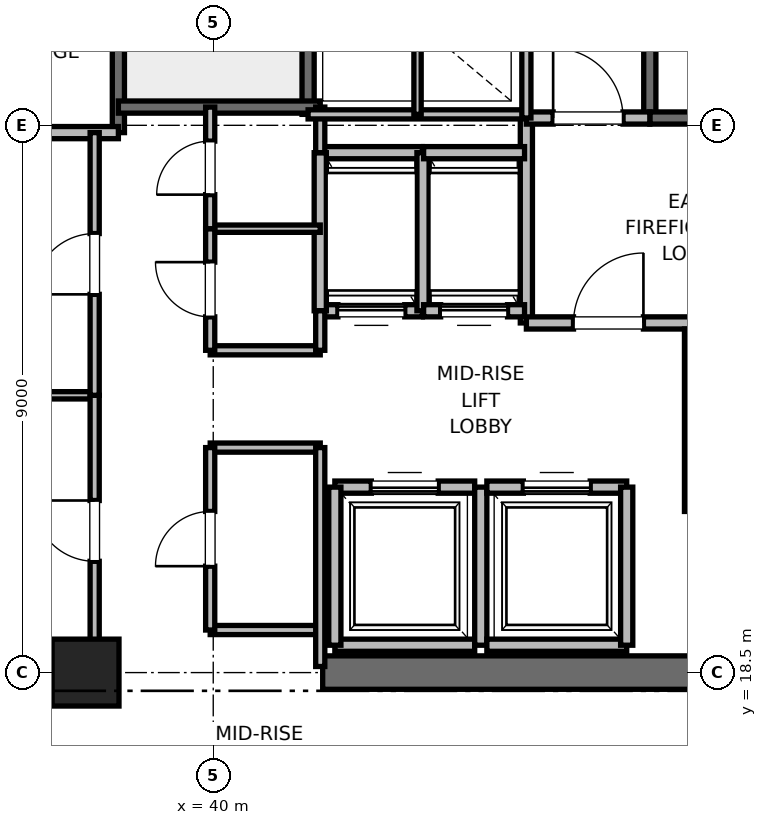
"""IFC4 building model, lengths in metres.
Left out: names, types, materials, properties, quantities, classifications, styles, units other than length and angle.
Written with IfcOpenShell. Run it as: python <this file> out.ifc"""

import sys

from ifc_helpers import new_model, si_unit, direction, frame, frame_2d, origin, origin_2d, place, context, subcontext, project, spatial, rectangle, extrude, element, fill, save


model = new_model("IFC4")
c1 = context("Model", 3, precision=1e-05, world=origin(), true_north=direction((0.0, 1.0)))
c2 = subcontext(c1, "Body", "Model", "MODEL_VIEW")
j1 = project(units=[si_unit("LENGTHUNIT", "METRE"), si_unit("PLANEANGLEUNIT", "RADIAN")], contexts=[c1])
p1 = place(None, origin())
s1 = spatial("IfcSite", under=j1, at=p1, CompositionType="ELEMENT")
p2 = place(p1, origin())
s2 = spatial("IfcBuilding", under=s1, at=p2, CompositionType="ELEMENT")
p3 = place(p2, frame((0.0, 0.0, 168.4)))
s3 = spatial("IfcBuildingStorey", under=s2, at=p3, CompositionType="ELEMENT", Elevation=168.4)
p4 = place(p3, frame((37.9, 18.5, 0.0), z_axis=(0.0, 0.0, 1.0), x_axis=(1.0, 0.0, 0.0)))
e1 = element("IfcColumn", 1, at=p4, inside=s3, PredefinedType="PILASTER", context=c2, shape_type="SweptSolid", body=[
    extrude(rectangle(XDim=1.1, YDim=1.1, at=origin_2d()), origin(), (0.0, 0.0, 1.0), 4.0),
])
for number, where, z_axis, x_axis in (
    (2, (29.0, 18.5, 0.0), (0.0, 0.0, 1.0), (1.0, 0.0, 0.0)),
    (3, (41.8, 18.5, 0.0), (0.0, 0.0, 1.0), (1.0, 0.0, 0.0)),
):
    element("IfcWall", number, at=place(p3, frame(where, z_axis=z_axis, x_axis=x_axis)), inside=s3, PredefinedType="SHEAR", context=c2, shape_type="SweptSolid", body=[
        extrude(rectangle(XDim=9.2, YDim=0.55, at=frame_2d((4.6, 0.0))), origin(), (0.0, 0.0, 1.0), 3.775),
    ])
p5 = place(p3, frame((47.18, 27.62, 0.0), z_axis=(0.0, 0.0, 1.0), x_axis=(0.0, 1.0, 0.0)))
e4 = element("IfcWall", 4, at=p5, inside=s3, PredefinedType="SOLIDWALL", context=c2, shape_type="SweptSolid", body=[
    extrude(rectangle(XDim=8.18, YDim=0.2, at=frame_2d((4.09, 0.0))), origin(), (0.0, 0.0, 1.0), 3.775),
])
p6 = place(p3, frame((47.18, 27.62, 0.0), z_axis=(0.0, 0.0, 1.0), x_axis=(1.0, 0.0, 0.0)))
e5 = element("IfcWall", 5, at=p6, inside=s3, PredefinedType="SOLIDWALL", context=c2, shape_type="SweptSolid", body=[
    extrude(rectangle(XDim=3.12, YDim=0.2, at=frame_2d((1.56, 0.0))), origin(), (0.0, 0.0, 1.0), 3.775),
])
p7 = place(p6, frame((1.01, 0.0, 0.0)))
e6 = element("IfcOpeningElement", 6, at=p7, cuts=e5, PredefinedType="OPENING", context=c2, shape_type="SweptSolid", body=[
    extrude(rectangle(XDim=1.1, YDim=2.15, at=frame_2d((0.55, 1.075))), frame((0.0, 0.1, 0.0), z_axis=(0.0, -1.0, 0.0), x_axis=(1.0, 0.0, 0.0)), (0.0, 0.0, 1.0), 0.2),
])
p8 = place(p3, frame((38.44, 27.38, 0.0), z_axis=(0.0, 0.0, 1.0), x_axis=(0.0, 1.0, 0.0)))
e7 = element("IfcWall", 7, at=p8, inside=s3, PredefinedType="SOLIDWALL", context=c2, shape_type="SweptSolid", body=[
    extrude(rectangle(XDim=8.87, YDim=0.2, at=frame_2d((4.435, 0.0))), origin(), (0.0, 0.0, 1.0), 3.775),
])
p9 = place(p3, frame((41.56, 27.68, 0.0), z_axis=(0.0, 0.0, 1.0), x_axis=(0.0, 1.0, 0.0)))
e8 = element("IfcWall", 8, at=p9, inside=s3, PredefinedType="SOLIDWALL", context=c2, shape_type="SweptSolid", body=[
    extrude(rectangle(XDim=8.57, YDim=0.2, at=frame_2d((4.285, 0.0))), origin(), (0.0, 0.0, 1.0), 3.775),
])
p10 = place(p3, frame((38.44, 27.8, 0.0), z_axis=(0.0, 0.0, 1.0), x_axis=(1.0, 0.0, 0.0)))
e9 = element("IfcWall", 9, at=p10, inside=s3, PredefinedType="SOLIDWALL", context=c2, shape_type="SweptSolid", body=[
    extrude(rectangle(XDim=3.32, YDim=0.2, at=frame_2d((1.66, 0.0))), origin(), (0.0, 0.0, 1.0), 3.775),
])
p11 = place(p3, frame((32.82, 27.38, 0.0), z_axis=(0.0, 0.0, 1.0), x_axis=(1.0, 0.0, 0.0)))
e10 = element("IfcWall", 10, at=p11, inside=s3, PredefinedType="PARTITIONING", context=c2, shape_type="SweptSolid", body=[
    extrude(rectangle(XDim=5.62, YDim=0.2, at=frame_2d((2.81, 0.0))), origin(), (0.0, 0.0, 1.0), 3.775),
])
p12 = place(p3, frame((45.15, 24.25, 0.0), z_axis=(0.0, 0.0, 1.0), x_axis=(0.0, 1.0, 0.0)))
e11 = element("IfcWall", 11, at=p12, inside=s3, PredefinedType="PARTITIONING", context=c2, shape_type="SweptSolid", body=[
    extrude(rectangle(XDim=3.37, YDim=0.2, at=frame_2d((1.685, 0.0))), origin(), (0.0, 0.0, 1.0), 3.775),
])
p13 = place(p3, frame((45.15, 24.25, 0.0), z_axis=(0.0, 0.0, 1.0), x_axis=(1.0, 0.0, 0.0)))
e12 = element("IfcWall", 12, at=p13, inside=s3, PredefinedType="PARTITIONING", context=c2, shape_type="SweptSolid", body=[
    extrude(rectangle(XDim=2.7, YDim=0.2, at=frame_2d((1.35, 0.0))), origin(), (0.0, 0.0, 1.0), 3.775),
])
p14 = place(p13, frame((0.775, 0.0, 0.0)))
e13 = element("IfcOpeningElement", 13, at=p14, cuts=e12, PredefinedType="OPENING", context=c2, shape_type="SweptSolid", body=[
    extrude(rectangle(XDim=1.15, YDim=2.2, at=frame_2d((0.575, 1.1))), frame((0.0, 0.1, 0.0), z_axis=(0.0, -1.0, 0.0), x_axis=(1.0, 0.0, 0.0)), (0.0, 0.0, 1.0), 0.2),
])
p15 = place(p3, frame((45.15, 27.62, 0.0), z_axis=(0.0, 0.0, 1.0), x_axis=(1.0, 0.0, 0.0)))
e14 = element("IfcWall", 14, at=p15, inside=s3, PredefinedType="PARTITIONING", context=c2, shape_type="SweptSolid", body=[
    extrude(rectangle(XDim=2.03, YDim=0.2, at=frame_2d((1.015, 0.0))), origin(), (0.0, 0.0, 1.0), 3.775),
])
p16 = place(p15, frame((0.44, 0.0, 0.0)))
e15 = element("IfcOpeningElement", 15, at=p16, cuts=e14, PredefinedType="OPENING", context=c2, shape_type="SweptSolid", body=[
    extrude(rectangle(XDim=1.15, YDim=2.2, at=frame_2d((0.575, 1.1))), frame((0.0, 0.1, 0.0), z_axis=(0.0, -1.0, 0.0), x_axis=(1.0, 0.0, 0.0)), (0.0, 0.0, 1.0), 0.2),
])
p17 = place(p3, frame((47.85, 24.15, 0.0), z_axis=(0.0, 0.0, 1.0), x_axis=(0.0, -1.0, 0.0)))
e16 = element("IfcWall", 16, at=p17, inside=s3, PredefinedType="SOLIDWALL", context=c2, shape_type="SweptSolid", body=[
    extrude(rectangle(XDim=3.0, YDim=0.2, at=frame_2d((1.5, 0.0))), origin(), (0.0, 0.0, 1.0), 3.775),
])
p18 = place(p3, frame((42.0, 18.95, 0.0), z_axis=(0.0, 0.0, 1.0), x_axis=(1.0, 0.0, 0.0)))
e17 = element("IfcWall", 17, at=p18, inside=s3, PredefinedType="SOLIDWALL", context=c2, shape_type="SweptSolid", body=[
    extrude(rectangle(XDim=2.3, YDim=0.2, at=frame_2d((1.15, 0.0))), origin(), (0.0, 0.0, 1.0), 2.755),
])
p19 = place(p3, frame((44.3, 21.55, 0.0), z_axis=(0.0, 0.0, 1.0), x_axis=(-1.0, 0.0, 0.0)))
e18 = element("IfcWall", 18, at=p19, inside=s3, PredefinedType="SOLIDWALL", context=c2, shape_type="SweptSolid", body=[
    extrude(rectangle(XDim=2.3, YDim=0.2, at=frame_2d((1.15, 0.0))), origin(), (0.0, 0.0, 1.0), 3.775),
])
p20 = place(p19, frame((0.6, 0.0, 0.0)))
e19 = element("IfcOpeningElement", 19, at=p20, cuts=e18, PredefinedType="OPENING", context=c2, shape_type="SweptSolid", body=[
    extrude(rectangle(XDim=1.1, YDim=2.2, at=frame_2d((0.55, 1.1))), frame((0.0, 0.1, 0.0), z_axis=(0.0, -1.0, 0.0), x_axis=(1.0, 0.0, 0.0)), (0.0, 0.0, 1.0), 0.2),
])
p21 = place(p3, frame((42.0, 21.55, 0.0), z_axis=(0.0, 0.0, 1.0), x_axis=(0.0, -1.0, 0.0)))
e20 = element("IfcWall", 20, at=p21, inside=s3, PredefinedType="SOLIDWALL", context=c2, shape_type="SweptSolid", body=[
    extrude(rectangle(XDim=2.6, YDim=0.2, at=frame_2d((1.3, 0.0))), origin(), (0.0, 0.0, 1.0), 2.755),
])
p22 = place(p3, frame((44.4, 18.95, 0.0), z_axis=(0.0, 0.0, 1.0), x_axis=(0.0, 1.0, 0.0)))
e21 = element("IfcWall", 21, at=p22, inside=s3, PredefinedType="SOLIDWALL", context=c2, shape_type="SweptSolid", body=[
    extrude(rectangle(XDim=2.6, YDim=0.2, at=frame_2d((1.3, 0.0))), origin(), (0.0, 0.0, 1.0), 3.775),
])
p23 = place(p3, frame((44.5, 18.95, 0.0), z_axis=(0.0, 0.0, 1.0), x_axis=(1.0, 0.0, 0.0)))
e22 = element("IfcWall", 22, at=p23, inside=s3, PredefinedType="SOLIDWALL", context=c2, shape_type="SweptSolid", body=[
    extrude(rectangle(XDim=2.3, YDim=0.2, at=frame_2d((1.15, 0.0))), origin(), (0.0, 0.0, 1.0), 3.775),
])
p24 = place(p3, frame((46.8, 21.55, 0.0), z_axis=(0.0, 0.0, 1.0), x_axis=(-1.0, 0.0, 0.0)))
e23 = element("IfcWall", 23, at=p24, inside=s3, PredefinedType="SOLIDWALL", context=c2, shape_type="SweptSolid", body=[
    extrude(rectangle(XDim=2.3, YDim=0.2, at=frame_2d((1.15, 0.0))), origin(), (0.0, 0.0, 1.0), 3.775),
])
p25 = place(p24, frame((0.6, 0.0, 0.0)))
e24 = element("IfcOpeningElement", 24, at=p25, cuts=e23, PredefinedType="OPENING", context=c2, shape_type="SweptSolid", body=[
    extrude(rectangle(XDim=1.1, YDim=2.2, at=frame_2d((0.55, 1.1))), frame((0.0, 0.1, 0.0), z_axis=(0.0, -1.0, 0.0), x_axis=(1.0, 0.0, 0.0)), (0.0, 0.0, 1.0), 0.2),
])
p26 = place(p3, frame((46.8, 18.95, 0.0), z_axis=(0.0, 0.0, 1.0), x_axis=(0.0, 1.0, 0.0)))
e25 = element("IfcWall", 25, at=p26, inside=s3, PredefinedType="SOLIDWALL", context=c2, shape_type="SweptSolid", body=[
    extrude(rectangle(XDim=2.6, YDim=0.2, at=frame_2d((1.3, 0.0))), origin(), (0.0, 0.0, 1.0), 3.775),
])
p27 = place(p3, frame((41.76, 24.45, 0.0), z_axis=(0.0, 0.0, 1.0), x_axis=(1.0, 0.0, 0.0)))
e26 = element("IfcWall", 26, at=p27, inside=s3, PredefinedType="SOLIDWALL", context=c2, shape_type="SweptSolid", body=[
    extrude(rectangle(XDim=1.68, YDim=0.2, at=frame_2d((0.84, 0.0))), origin(), (0.0, 0.0, 1.0), 3.775),
])
p28 = place(p27, frame((0.29, 0.0, 0.0)))
e27 = element("IfcOpeningElement", 27, at=p28, cuts=e26, PredefinedType="OPENING", context=c2, shape_type="SweptSolid", body=[
    extrude(rectangle(XDim=1.1, YDim=2.2, at=frame_2d((0.55, 1.1))), frame((0.0, 0.1, 0.0), z_axis=(0.0, -1.0, 0.0), x_axis=(1.0, 0.0, 0.0)), (0.0, 0.0, 1.0), 0.2),
])
p29 = place(p3, frame((43.44, 27.05, 0.0), z_axis=(0.0, 0.0, 1.0), x_axis=(-1.0, 0.0, 0.0)))
e28 = element("IfcWall", 28, at=p29, inside=s3, PredefinedType="SOLIDWALL", context=c2, shape_type="SweptSolid", body=[
    extrude(rectangle(XDim=1.68, YDim=0.2, at=frame_2d((0.84, 0.0))), origin(), (0.0, 0.0, 1.0), 3.775),
])
for number, where, z_axis, x_axis in (
    (29, (41.76, 27.05, 0.0), (0.0, 0.0, 1.0), (0.0, -1.0, 0.0)),
    (30, (43.45, 24.45, 0.0), (0.0, 0.0, 1.0), (0.0, 1.0, 0.0)),
):
    element("IfcWall", number, at=place(p3, frame(where, z_axis=z_axis, x_axis=x_axis)), inside=s3, PredefinedType="SOLIDWALL", context=c2, shape_type="SweptSolid", body=[
        extrude(rectangle(XDim=2.6, YDim=0.2, at=frame_2d((1.3, 0.0))), origin(), (0.0, 0.0, 1.0), 3.775),
    ])
p30 = place(p3, frame((43.46, 24.45, 0.0), z_axis=(0.0, 0.0, 1.0), x_axis=(1.0, 0.0, 0.0)))
e31 = element("IfcWall", 31, at=p30, inside=s3, PredefinedType="SOLIDWALL", context=c2, shape_type="SweptSolid", body=[
    extrude(rectangle(XDim=1.66, YDim=0.2, at=frame_2d((0.83, 0.0))), origin(), (0.0, 0.0, 1.0), 3.775),
])
p31 = place(p30, frame((0.28, 0.0, 0.0)))
e32 = element("IfcOpeningElement", 32, at=p31, cuts=e31, PredefinedType="OPENING", context=c2, shape_type="SweptSolid", body=[
    extrude(rectangle(XDim=1.1, YDim=2.2, at=frame_2d((0.55, 1.1))), frame((0.0, 0.1, 0.0), z_axis=(0.0, -1.0, 0.0), x_axis=(1.0, 0.0, 0.0)), (0.0, 0.0, 1.0), 0.2),
])
p32 = place(p3, frame((45.12, 27.05, 0.0), z_axis=(0.0, 0.0, 1.0), x_axis=(-1.0, 0.0, 0.0)))
e33 = element("IfcWall", 33, at=p32, inside=s3, PredefinedType="SOLIDWALL", context=c2, shape_type="SweptSolid", body=[
    extrude(rectangle(XDim=1.66, YDim=0.2, at=frame_2d((0.83, 0.0))), origin(), (0.0, 0.0, 1.0), 3.775),
])
for number, where, z_axis, x_axis in (
    (34, (39.95, 19.2, 0.0), (0.0, 0.0, 1.0), (1.0, 0.0, 0.0)),
    (35, (39.95, 22.2, 0.0), (0.0, 0.0, 1.0), (1.0, 0.0, 0.0)),
    (36, (39.95, 23.8, 0.0), (0.0, 0.0, 1.0), (1.0, 0.0, 0.0)),
):
    element("IfcWall", number, at=place(p3, frame(where, z_axis=z_axis, x_axis=x_axis)), inside=s3, PredefinedType="PARTITIONING", context=c2, shape_type="SweptSolid", body=[
        extrude(rectangle(XDim=1.81, YDim=0.15, at=frame_2d((0.905, 0.0))), origin(), (0.0, 0.0, 1.0), 2.85),
    ])
p33 = place(p3, frame((39.95, 25.8, 0.0), z_axis=(0.0, 0.0, 1.0), x_axis=(1.0, 0.0, 0.0)))
e37 = element("IfcWall", 37, at=p33, inside=s3, PredefinedType="PARTITIONING", context=c2, shape_type="SweptSolid", body=[
    extrude(rectangle(XDim=1.81, YDim=0.12, at=frame_2d((0.905, 0.0))), origin(), (0.0, 0.0, 1.0), 2.85),
])
p34 = place(p3, frame((41.76, 18.6, 0.0), z_axis=(0.0, 0.0, 1.0), x_axis=(0.0, 1.0, 0.0)))
e38 = element("IfcWall", 38, at=p34, inside=s3, PredefinedType="PARTITIONING", context=c2, shape_type="SweptSolid", body=[
    extrude(rectangle(XDim=3.6, YDim=0.15, at=frame_2d((1.8, 0.0))), origin(), (0.0, 0.0, 1.0), 2.755),
])
p35 = place(p3, frame((41.76, 23.8, 0.0), z_axis=(0.0, 0.0, 1.0), x_axis=(0.0, 1.0, 0.0)))
e39 = element("IfcWall", 39, at=p35, inside=s3, PredefinedType="PARTITIONING", context=c2, shape_type="SweptSolid", body=[
    extrude(rectangle(XDim=0.65, YDim=0.15, at=frame_2d((0.325, 0.0))), origin(), (0.0, 0.0, 1.0), 2.85),
])
p36 = place(p3, frame((41.76, 27.05, 0.0), z_axis=(0.0, 0.0, 1.0), x_axis=(0.0, 1.0, 0.0)))
e40 = element("IfcWall", 40, at=p36, inside=s3, PredefinedType="PARTITIONING", context=c2, shape_type="SweptSolid", body=[
    extrude(rectangle(XDim=0.75, YDim=0.15, at=frame_2d((0.375, 0.0))), origin(), (0.0, 0.0, 1.0), 2.85),
])
p37 = place(p3, frame((39.95, 19.2, 0.0), z_axis=(0.0, 0.0, 1.0), x_axis=(0.0, 1.0, 0.0)))
e41 = element("IfcWall", 41, at=p37, inside=s3, PredefinedType="PARTITIONING", context=c2, shape_type="SweptSolid", body=[
    extrude(rectangle(XDim=3.0, YDim=0.15, at=frame_2d((1.5, 0.0))), origin(), (0.0, 0.0, 1.0), 2.85),
])
p38 = place(p37, frame((1.05, 0.0, 0.0)))
e42 = element("IfcOpeningElement", 42, at=p38, cuts=e41, PredefinedType="OPENING", context=c2, shape_type="SweptSolid", body=[
    extrude(rectangle(XDim=0.9, YDim=2.1, at=frame_2d((0.45, 1.05))), frame((0.0, 0.075, 0.0), z_axis=(0.0, -1.0, 0.0), x_axis=(1.0, 0.0, 0.0)), (0.0, 0.0, 1.0), 0.15),
])
p39 = place(p3, frame((39.95, 23.8, 0.0), z_axis=(0.0, 0.0, 1.0), x_axis=(0.0, 1.0, 0.0)))
e43 = element("IfcWall", 43, at=p39, inside=s3, PredefinedType="PARTITIONING", context=c2, shape_type="SweptSolid", body=[
    extrude(rectangle(XDim=2.0, YDim=0.15, at=frame_2d((1.0, 0.0))), origin(), (0.0, 0.0, 1.0), 2.85),
])
p40 = place(p39, frame((0.55, 0.0, 0.0)))
e44 = element("IfcOpeningElement", 44, at=p40, cuts=e43, PredefinedType="OPENING", context=c2, shape_type="SweptSolid", body=[
    extrude(rectangle(XDim=0.9, YDim=2.1, at=frame_2d((0.45, 1.05))), frame((0.0, 0.075, 0.0), z_axis=(0.0, -1.0, 0.0), x_axis=(1.0, 0.0, 0.0)), (0.0, 0.0, 1.0), 0.15),
])
p41 = place(p3, frame((39.95, 25.8, 0.0), z_axis=(0.0, 0.0, 1.0), x_axis=(0.0, 1.0, 0.0)))
e45 = element("IfcWall", 45, at=p41, inside=s3, PredefinedType="PARTITIONING", context=c2, shape_type="SweptSolid", body=[
    extrude(rectangle(XDim=2.0, YDim=0.15, at=frame_2d((1.0, 0.0))), origin(), (0.0, 0.0, 1.0), 2.85),
])
p42 = place(p41, frame((0.56, 0.0, 0.0)))
e46 = element("IfcOpeningElement", 46, at=p42, cuts=e45, PredefinedType="OPENING", context=c2, shape_type="SweptSolid", body=[
    extrude(rectangle(XDim=0.88, YDim=2.1, at=frame_2d((0.44, 1.05))), frame((0.0, 0.075, 0.0), z_axis=(0.0, -1.0, 0.0), x_axis=(1.0, 0.0, 0.0)), (0.0, 0.0, 1.0), 0.15),
])
p43 = place(p3, frame((32.82, 23.06, 0.0), z_axis=(0.0, 0.0, 1.0), x_axis=(1.0, 0.0, 0.0)))
e47 = element("IfcWall", 47, at=p43, inside=s3, PredefinedType="PARTITIONING", context=c2, shape_type="SweptSolid", body=[
    extrude(rectangle(XDim=5.23, YDim=0.12, at=frame_2d((2.615, 0.0))), origin(), (0.0, 0.0, 1.0), 2.85),
])
p44 = place(p3, frame((38.05, 18.6, 0.0), z_axis=(0.0, 0.0, 1.0), x_axis=(0.0, 1.0, 0.0)))
e48 = element("IfcWall", 48, at=p44, inside=s3, PredefinedType="PARTITIONING", context=c2, shape_type="SweptSolid", body=[
    extrude(rectangle(XDim=4.46, YDim=0.15, at=frame_2d((2.23, 0.0))), origin(), (0.0, 0.0, 1.0), 2.755),
])
p45 = place(p44, frame((1.73, 0.0, 0.0)))
e49 = element("IfcOpeningElement", 49, at=p45, cuts=e48, PredefinedType="OPENING", context=c2, shape_type="SweptSolid", body=[
    extrude(rectangle(XDim=1.0, YDim=2.15, at=frame_2d((0.5, 1.075))), frame((0.0, 0.075, 0.0), z_axis=(0.0, -1.0, 0.0), x_axis=(1.0, 0.0, 0.0)), (0.0, 0.0, 1.0), 0.15),
])
p46 = place(p3, frame((38.05, 23.06, 0.0), z_axis=(0.0, 0.0, 1.0), x_axis=(0.0, 1.0, 0.0)))
e50 = element("IfcWall", 50, at=p46, inside=s3, PredefinedType="PARTITIONING", context=c2, shape_type="SweptSolid", body=[
    extrude(rectangle(XDim=4.32, YDim=0.15, at=frame_2d((2.16, 0.0))), origin(), (0.0, 0.0, 1.0), 2.85),
])
p47 = place(p46, frame((1.66, 0.0, 0.0)))
e51 = element("IfcOpeningElement", 51, at=p47, cuts=e50, PredefinedType="OPENING", context=c2, shape_type="SweptSolid", body=[
    extrude(rectangle(XDim=1.0, YDim=2.15, at=frame_2d((0.5, 1.075))), frame((0.0, 0.075, 0.0), z_axis=(0.0, -1.0, 0.0), x_axis=(1.0, 0.0, 0.0)), (0.0, 0.0, 1.0), 0.15),
])
p48 = place(p3, frame((41.56, 27.68, 0.0), z_axis=(0.0, 0.0, 1.0), x_axis=(1.0, 0.0, 0.0)))
e52 = element("IfcWall", 52, at=p48, inside=s3, PredefinedType="PARTITIONING", context=c2, shape_type="SweptSolid", body=[
    extrude(rectangle(XDim=3.59, YDim=0.15, at=frame_2d((1.795, 0.0))), origin(), (0.0, 0.0, 1.0), 2.85),
])
p49 = place(p3, frame((45.15, 27.62, 0.0), z_axis=(0.0, 0.0, 1.0), x_axis=(0.0, 1.0, 0.0)))
e53 = element("IfcWall", 53, at=p49, inside=s3, PredefinedType="PARTITIONING", context=c2, shape_type="SweptSolid", body=[
    extrude(rectangle(XDim=3.1, YDim=0.15, at=frame_2d((1.55, 0.0))), origin(), (0.0, 0.0, 1.0), 2.85),
])
p50 = place(p3, frame((43.36, 27.68, 0.0), z_axis=(0.0, 0.0, 1.0), x_axis=(0.0, 1.0, 0.0)))
e54 = element("IfcWall", 54, at=p50, inside=s3, PredefinedType="PARTITIONING", context=c2, shape_type="SweptSolid", body=[
    extrude(rectangle(XDim=3.04, YDim=0.12, at=frame_2d((1.52, 0.0))), origin(), (0.0, 0.0, 1.0), 2.85),
])
p51 = place(p14, origin())
e55 = element("IfcDoor", 55, at=p51, inside=s3, OperationType="SINGLE_SWING_RIGHT", PredefinedType="DOOR", context=c2, shape_type="SweptSolid", body=[
    extrude(rectangle(XDim=1.15, YDim=2.2, at=frame_2d((0.575, 1.1))), frame((0.0, 0.025, 0.0), z_axis=(0.0, -1.0, 0.0), x_axis=(1.0, 0.0, 0.0)), (0.0, 0.0, 1.0), 0.05),
])
fill(e13, e55)
p52 = place(p16, origin())
e56 = element("IfcDoor", 56, at=p52, inside=s3, OperationType="SINGLE_SWING_LEFT", PredefinedType="DOOR", context=c2, shape_type="SweptSolid", body=[
    extrude(rectangle(XDim=1.15, YDim=2.2, at=frame_2d((0.575, 1.1))), frame((0.0, 0.025, 0.0), z_axis=(0.0, -1.0, 0.0), x_axis=(1.0, 0.0, 0.0)), (0.0, 0.0, 1.0), 0.05),
])
fill(e15, e56)
p53 = place(p20, origin())
e57 = element("IfcDoor", 57, at=p53, inside=s3, OperationType="SLIDING_TO_RIGHT", PredefinedType="DOOR", context=c2, shape_type="SweptSolid", body=[
    extrude(rectangle(XDim=1.1, YDim=2.2, at=frame_2d((0.55, 1.1))), frame((0.0, 0.025, 0.0), z_axis=(0.0, -1.0, 0.0), x_axis=(1.0, 0.0, 0.0)), (0.0, 0.0, 1.0), 0.05),
])
fill(e19, e57)
p54 = place(p25, origin())
e58 = element("IfcDoor", 58, at=p54, inside=s3, OperationType="SLIDING_TO_RIGHT", PredefinedType="DOOR", context=c2, shape_type="SweptSolid", body=[
    extrude(rectangle(XDim=1.1, YDim=2.2, at=frame_2d((0.55, 1.1))), frame((0.0, 0.025, 0.0), z_axis=(0.0, -1.0, 0.0), x_axis=(1.0, 0.0, 0.0)), (0.0, 0.0, 1.0), 0.05),
])
fill(e24, e58)
p55 = place(p28, origin())
e59 = element("IfcDoor", 59, at=p55, inside=s3, OperationType="SLIDING_TO_RIGHT", PredefinedType="DOOR", context=c2, shape_type="SweptSolid", body=[
    extrude(rectangle(XDim=1.1, YDim=2.2, at=frame_2d((0.55, 1.1))), frame((0.0, 0.025, 0.0), z_axis=(0.0, -1.0, 0.0), x_axis=(1.0, 0.0, 0.0)), (0.0, 0.0, 1.0), 0.05),
])
fill(e27, e59)
p56 = place(p31, origin())
e60 = element("IfcDoor", 60, at=p56, inside=s3, OperationType="SLIDING_TO_RIGHT", PredefinedType="DOOR", context=c2, shape_type="SweptSolid", body=[
    extrude(rectangle(XDim=1.1, YDim=2.2, at=frame_2d((0.55, 1.1))), frame((0.0, 0.025, 0.0), z_axis=(0.0, -1.0, 0.0), x_axis=(1.0, 0.0, 0.0)), (0.0, 0.0, 1.0), 0.05),
])
fill(e32, e60)
p57 = place(p38, origin())
e61 = element("IfcDoor", 61, at=p57, inside=s3, OperationType="SINGLE_SWING_LEFT", PredefinedType="DOOR", context=c2, shape_type="SweptSolid", body=[
    extrude(rectangle(XDim=0.9, YDim=2.1, at=frame_2d((0.45, 1.05))), frame((0.0, 0.025, 0.0), z_axis=(0.0, -1.0, 0.0), x_axis=(1.0, 0.0, 0.0)), (0.0, 0.0, 1.0), 0.05),
])
fill(e42, e61)
p58 = place(p40, origin())
e62 = element("IfcDoor", 62, at=p58, inside=s3, OperationType="SINGLE_SWING_RIGHT", PredefinedType="DOOR", context=c2, shape_type="SweptSolid", body=[
    extrude(rectangle(XDim=0.9, YDim=2.1, at=frame_2d((0.45, 1.05))), frame((0.0, 0.025, 0.0), z_axis=(0.0, -1.0, 0.0), x_axis=(1.0, 0.0, 0.0)), (0.0, 0.0, 1.0), 0.05),
])
fill(e44, e62)
p59 = place(p42, origin())
e63 = element("IfcDoor", 63, at=p59, inside=s3, OperationType="SINGLE_SWING_LEFT", PredefinedType="DOOR", context=c2, shape_type="SweptSolid", body=[
    extrude(rectangle(XDim=0.88, YDim=2.1, at=frame_2d((0.44, 1.05))), frame((0.0, 0.025, 0.0), z_axis=(0.0, -1.0, 0.0), x_axis=(1.0, 0.0, 0.0)), (0.0, 0.0, 1.0), 0.05),
])
fill(e46, e63)
p60 = place(p45, origin())
e64 = element("IfcDoor", 64, at=p60, inside=s3, OperationType="SINGLE_SWING_RIGHT", PredefinedType="DOOR", context=c2, shape_type="SweptSolid", body=[
    extrude(rectangle(XDim=1.0, YDim=2.15, at=frame_2d((0.5, 1.075))), frame((0.0, 0.025, 0.0), z_axis=(0.0, -1.0, 0.0), x_axis=(1.0, 0.0, 0.0)), (0.0, 0.0, 1.0), 0.05),
])
fill(e49, e64)
p61 = place(p47, origin())
e65 = element("IfcDoor", 65, at=p61, inside=s3, OperationType="SINGLE_SWING_LEFT", PredefinedType="DOOR", context=c2, shape_type="SweptSolid", body=[
    extrude(rectangle(XDim=1.0, YDim=2.15, at=frame_2d((0.5, 1.075))), frame((0.0, 0.025, 0.0), z_axis=(0.0, -1.0, 0.0), x_axis=(1.0, 0.0, 0.0)), (0.0, 0.0, 1.0), 0.05),
])
fill(e51, e65)
save(model, sys.argv[1])
